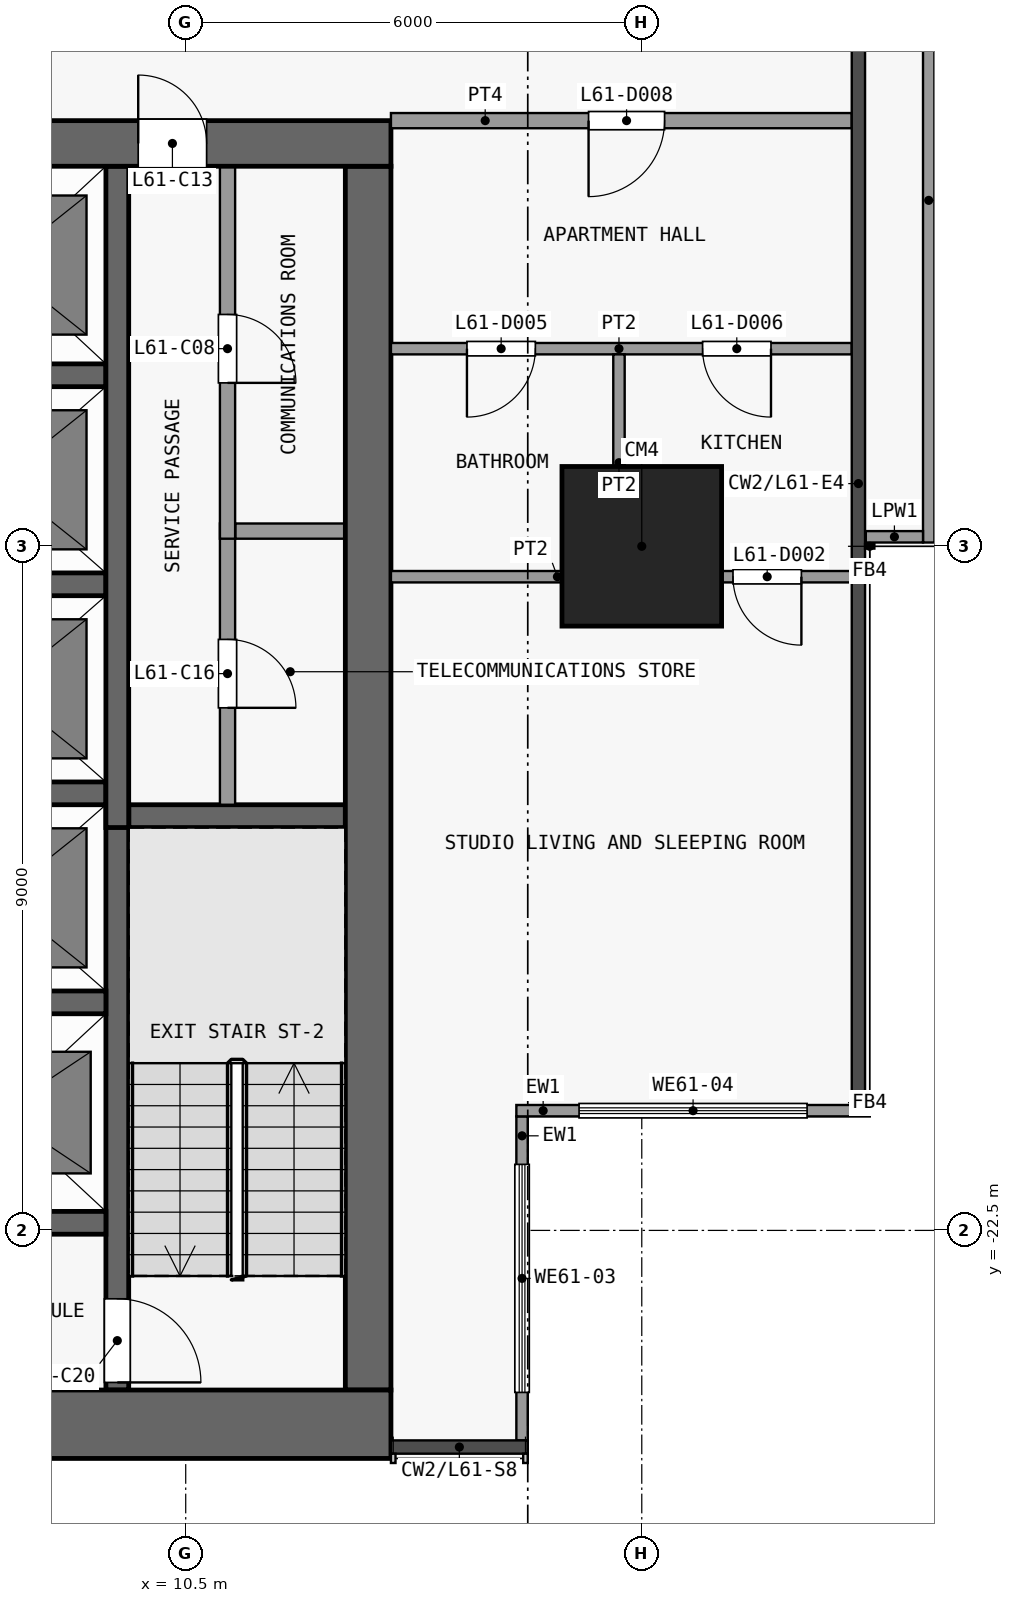
"""IFC4 building model, lengths in metres.
Left out: names, types, materials, properties, quantities, classifications, styles, units other than length and angle.
Written with IfcOpenShell. Run it as: python <this file> out.ifc"""

import sys

from ifc_helpers import new_model, si_unit, direction, frame, frame_2d, origin, origin_2d, place, context, subcontext, project, spatial, rectangle, extrude, element, fill, save


model = new_model("IFC4")
c1 = context("Model", 3, precision=1e-05, world=origin(), true_north=direction((0.0, 1.0)))
c2 = subcontext(c1, "Body", "Model", "MODEL_VIEW")
j1 = project(units=[si_unit("LENGTHUNIT", "METRE"), si_unit("PLANEANGLEUNIT", "RADIAN")], contexts=[c1])
p1 = place(None, origin())
s1 = spatial("IfcSite", under=j1, at=p1, CompositionType="ELEMENT")
p2 = place(p1, origin())
s2 = spatial("IfcBuilding", under=s1, at=p2, CompositionType="ELEMENT")
p3 = place(p2, frame((0.0, 0.0, 241.1)))
s3 = spatial("IfcBuildingStorey", under=s2, at=p3, CompositionType="ELEMENT", Elevation=241.1)
p4 = place(p3, frame((16.5, -13.5, 0.0), z_axis=(0.0, 0.0, 1.0), x_axis=(1.0, 0.0, 0.0)))
e1 = element("IfcColumn", 1, at=p4, inside=s3, PredefinedType="COLUMN", context=c2, shape_type="SweptSolid", body=[
    extrude(rectangle(XDim=2.1, YDim=2.1, at=origin_2d()), origin(), (0.0, 0.0, 1.0), 3.6),
])
p5 = place(p3, frame((-13.2, -25.05, 0.0), z_axis=(0.0, 0.0, 1.0), x_axis=(1.0, 0.0, 0.0)))
e2 = element("IfcWall", 2, at=p5, inside=s3, PredefinedType="SHEAR", context=c2, shape_type="SweptSolid", body=[
    extrude(rectangle(XDim=26.4, YDim=0.9, at=frame_2d((13.2, 0.0))), origin(), (0.0, 0.0, 1.0), 3.3),
])
p6 = place(p3, frame((-13.2, -8.2, 0.0), z_axis=(0.0, 0.0, 1.0), x_axis=(1.0, 0.0, 0.0)))
e3 = element("IfcWall", 3, at=p6, inside=s3, PredefinedType="SHEAR", context=c2, shape_type="SweptSolid", body=[
    extrude(rectangle(XDim=26.4, YDim=0.6, at=frame_2d((13.2, 0.0))), origin(), (0.0, 0.0, 1.0), 3.3),
])
p7 = place(p6, frame((7.5, 0.0, 0.0)))
e4 = element("IfcOpeningElement", 4, at=p7, cuts=e3, PredefinedType="OPENING", context=c2, shape_type="SweptSolid", body=[
    extrude(rectangle(XDim=1.8, YDim=2.1, at=frame_2d((0.9, 1.05))), frame((0.0, 0.31, 0.0), z_axis=(0.0, -1.0, 0.0), x_axis=(1.0, 0.0, 0.0)), (0.0, 0.0, 1.0), 0.62),
])
p8 = place(p6, frame((17.1, 0.0, 0.0)))
e5 = element("IfcOpeningElement", 5, at=p8, cuts=e3, PredefinedType="OPENING", context=c2, shape_type="SweptSolid", body=[
    extrude(rectangle(XDim=1.8, YDim=2.1, at=frame_2d((0.9, 1.05))), frame((0.0, 0.31, 0.0), z_axis=(0.0, -1.0, 0.0), x_axis=(1.0, 0.0, 0.0)), (0.0, 0.0, 1.0), 0.62),
])
p9 = place(p6, frame((2.425, 0.0, 0.0)))
e6 = element("IfcOpeningElement", 6, at=p9, cuts=e3, PredefinedType="OPENING", context=c2, shape_type="SweptSolid", body=[
    extrude(rectangle(XDim=0.9, YDim=2.1, at=frame_2d((0.45, 1.05))), frame((0.0, 0.31, 0.0), z_axis=(0.0, -1.0, 0.0), x_axis=(1.0, 0.0, 0.0)), (0.0, 0.0, 1.0), 0.62),
])
p10 = place(p6, frame((23.075, 0.0, 0.0)))
e7 = element("IfcOpeningElement", 7, at=p10, cuts=e3, PredefinedType="OPENING", context=c2, shape_type="SweptSolid", body=[
    extrude(rectangle(XDim=0.9, YDim=2.1, at=frame_2d((0.45, 1.05))), frame((0.0, 0.31, 0.0), z_axis=(0.0, -1.0, 0.0), x_axis=(1.0, 0.0, 0.0)), (0.0, 0.0, 1.0), 0.62),
])
p11 = place(p3, frame((12.9, -24.6, 0.0), z_axis=(0.0, 0.0, 1.0), x_axis=(0.0, 1.0, 0.0)))
e8 = element("IfcWall", 8, at=p11, inside=s3, PredefinedType="SHEAR", context=c2, shape_type="SweptSolid", body=[
    extrude(rectangle(XDim=16.1, YDim=0.6, at=frame_2d((8.05, 0.0))), origin(), (0.0, 0.0, 1.0), 3.3),
])
for number, where, z_axis, x_axis in (
    (9, (6.65, -22.4, 0.0), (0.0, 0.0, 1.0), (1.0, 0.0, 0.0)),
    (10, (6.65, -19.5, 0.0), (0.0, 0.0, 1.0), (1.0, 0.0, 0.0)),
):
    element("IfcWall", number, at=place(p3, frame(where, z_axis=z_axis, x_axis=x_axis)), inside=s3, PredefinedType="SHEAR", context=c2, shape_type="SweptSolid", body=[
        extrude(rectangle(XDim=2.8, YDim=0.3, at=frame_2d((1.4, 0.0))), origin(), (0.0, 0.0, 1.0), 3.3),
    ])
p12 = place(p3, frame((9.75, -17.05, 0.0), z_axis=(0.0, 0.0, 1.0), x_axis=(1.0, 0.0, 0.0)))
e11 = element("IfcWall", 11, at=p12, inside=s3, PredefinedType="SHEAR", context=c2, shape_type="SweptSolid", body=[
    extrude(rectangle(XDim=2.85, YDim=0.3, at=frame_2d((1.425, 0.0))), origin(), (0.0, 0.0, 1.0), 3.3),
])
for number, where, z_axis, x_axis in (
    (12, (6.65, -16.75, 0.0), (0.0, 0.0, 1.0), (1.0, 0.0, 0.0)),
    (13, (6.65, -14.0, 0.0), (0.0, 0.0, 1.0), (1.0, 0.0, 0.0)),
):
    element("IfcWall", number, at=place(p3, frame(where, z_axis=z_axis, x_axis=x_axis)), inside=s3, PredefinedType="SHEAR", context=c2, shape_type="SweptSolid", body=[
        extrude(rectangle(XDim=2.8, YDim=0.3, at=frame_2d((1.4, 0.0))), origin(), (0.0, 0.0, 1.0), 3.3),
    ])
p13 = place(p3, frame((11.15, -13.3, 0.0), z_axis=(0.0, 0.0, 1.0), x_axis=(1.0, 0.0, 0.0)))
e14 = element("IfcWall", 14, at=p13, inside=s3, PredefinedType="PARTITIONING", context=c2, shape_type="SweptSolid", body=[
    extrude(rectangle(XDim=1.45, YDim=0.2, at=frame_2d((0.725, 0.0))), origin(), (0.0, 0.0, 1.0), 3.3),
])
p14 = place(p3, frame((6.65, -11.25, 0.0), z_axis=(0.0, 0.0, 1.0), x_axis=(1.0, 0.0, 0.0)))
e15 = element("IfcWall", 15, at=p14, inside=s3, PredefinedType="SHEAR", context=c2, shape_type="SweptSolid", body=[
    extrude(rectangle(XDim=2.8, YDim=0.3, at=frame_2d((1.4, 0.0))), origin(), (0.0, 0.0, 1.0), 3.3),
])
p15 = place(p3, frame((9.6, -16.9, 0.0), z_axis=(0.0, 0.0, 1.0), x_axis=(0.0, -1.0, 0.0)))
e16 = element("IfcWall", 16, at=p15, inside=s3, PredefinedType="SHEAR", context=c2, shape_type="SweptSolid", body=[
    extrude(rectangle(XDim=7.7, YDim=0.3, at=frame_2d((3.85, 0.0))), origin(), (0.0, 0.0, 1.0), 3.3),
])
p16 = place(p15, frame((6.5, 0.0, 0.0)))
e17 = element("IfcOpeningElement", 17, at=p16, cuts=e16, PredefinedType="OPENING", context=c2, shape_type="SweptSolid", body=[
    extrude(rectangle(XDim=1.1, YDim=2.1, at=frame_2d((0.55, 1.05))), frame((0.0, 0.16, 0.0), z_axis=(0.0, -1.0, 0.0), x_axis=(1.0, 0.0, 0.0)), (0.0, 0.0, 1.0), 0.32),
])
p17 = place(p3, frame((9.6, -17.2, 0.0), z_axis=(0.0, 0.0, 1.0), x_axis=(0.0, 1.0, 0.0)))
e18 = element("IfcWall", 18, at=p17, inside=s3, PredefinedType="SHEAR", context=c2, shape_type="SweptSolid", body=[
    extrude(rectangle(XDim=8.7, YDim=0.3, at=frame_2d((4.35, 0.0))), origin(), (0.0, 0.0, 1.0), 3.3),
])
p18 = place(p3, frame((11.05, -13.2, 0.0), z_axis=(0.0, 0.0, 1.0), x_axis=(0.0, -1.0, 0.0)))
e19 = element("IfcWall", 19, at=p18, inside=s3, PredefinedType="PARTITIONING", context=c2, shape_type="SweptSolid", body=[
    extrude(rectangle(XDim=3.7, YDim=0.2, at=frame_2d((1.85, 0.0))), origin(), (0.0, 0.0, 1.0), 3.3),
])
p19 = place(p18, frame((1.525, 0.0, 0.0)))
e20 = element("IfcOpeningElement", 20, at=p19, cuts=e19, PredefinedType="OPENING", context=c2, shape_type="SweptSolid", body=[
    extrude(rectangle(XDim=0.9, YDim=2.1, at=frame_2d((0.45, 1.05))), frame((0.0, 0.11, 0.0), z_axis=(0.0, -1.0, 0.0), x_axis=(1.0, 0.0, 0.0)), (0.0, 0.0, 1.0), 0.22),
])
p20 = place(p3, frame((11.05, -8.5, 0.0), z_axis=(0.0, 0.0, 1.0), x_axis=(0.0, -1.0, 0.0)))
e21 = element("IfcWall", 21, at=p20, inside=s3, PredefinedType="PARTITIONING", context=c2, shape_type="SweptSolid", body=[
    extrude(rectangle(XDim=4.9, YDim=0.2, at=frame_2d((2.45, 0.0))), origin(), (0.0, 0.0, 1.0), 3.3),
])
p21 = place(p20, frame((1.95, 0.0, 0.0)))
e22 = element("IfcOpeningElement", 22, at=p21, cuts=e21, PredefinedType="OPENING", context=c2, shape_type="SweptSolid", body=[
    extrude(rectangle(XDim=0.9, YDim=2.1, at=frame_2d((0.45, 1.05))), frame((0.0, 0.11, 0.0), z_axis=(0.0, -1.0, 0.0), x_axis=(1.0, 0.0, 0.0)), (0.0, 0.0, 1.0), 0.22),
])
p22 = place(p3, frame((14.925, -21.0, 0.0), z_axis=(0.0, 0.0, 1.0), x_axis=(0.0, -1.0, 0.0)))
e23 = element("IfcWall", 23, at=p22, inside=s3, PredefinedType="SOLIDWALL", context=c2, shape_type="SweptSolid", body=[
    extrude(rectangle(XDim=4.262, YDim=0.15, at=frame_2d((2.131, 0.0))), origin(), (0.0, 0.0, 1.0), 3.3),
])
p23 = place(p22, frame((0.631, 0.0, 0.9)))
e24 = element("IfcOpeningElement", 24, at=p23, cuts=e23, PredefinedType="OPENING", context=c2, shape_type="SweptSolid", body=[
    extrude(rectangle(XDim=3.0, YDim=2.4, at=frame_2d((1.5, 1.2))), frame((0.0, 0.085, 0.0), z_axis=(0.0, -1.0, 0.0), x_axis=(1.0, 0.0, 0.0)), (0.0, 0.0, 1.0), 0.17),
])
p24 = place(p3, frame((19.5, -20.925, 0.0), z_axis=(0.0, 0.0, 1.0), x_axis=(-1.0, 0.0, 0.0)))
e25 = element("IfcWall", 25, at=p24, inside=s3, PredefinedType="SOLIDWALL", context=c2, shape_type="SweptSolid", body=[
    extrude(rectangle(XDim=4.65, YDim=0.15, at=frame_2d((2.325, 0.0))), origin(), (0.0, 0.0, 1.0), 3.3),
])
p25 = place(p24, frame((0.825, 0.0, 0.9)))
e26 = element("IfcOpeningElement", 26, at=p25, cuts=e25, PredefinedType="OPENING", context=c2, shape_type="SweptSolid", body=[
    extrude(rectangle(XDim=3.0, YDim=2.4, at=frame_2d((1.5, 1.2))), frame((0.0, 0.085, 0.0), z_axis=(0.0, -1.0, 0.0), x_axis=(1.0, 0.0, 0.0)), (0.0, 0.0, 1.0), 0.17),
])
p26 = place(p3, frame((20.275, -4.448, 0.0), z_axis=(0.0, 0.0, 1.0), x_axis=(0.0, -1.0, 0.0)))
e27 = element("IfcWall", 27, at=p26, inside=s3, PredefinedType="PARAPET", context=c2, shape_type="SweptSolid", body=[
    extrude(rectangle(XDim=9.002, YDim=0.15, at=frame_2d((4.501, 0.0))), origin(), (0.0, 0.0, 1.0), 1.15),
])
p27 = place(p3, frame((20.2, -13.375, 0.0), z_axis=(0.0, 0.0, 1.0), x_axis=(-1.0, 0.0, 0.0)))
e28 = element("IfcWall", 28, at=p27, inside=s3, PredefinedType="PARAPET", context=c2, shape_type="SweptSolid", body=[
    extrude(rectangle(XDim=0.752, YDim=0.15, at=frame_2d((0.376, 0.0))), origin(), (0.0, 0.0, 1.0), 1.15),
])
p28 = place(p3, frame((13.2, -13.9, 0.0), z_axis=(0.0, 0.0, 1.0), x_axis=(1.0, 0.0, 0.0)))
e29 = element("IfcWall", 29, at=p28, inside=s3, PredefinedType="PARTITIONING", context=c2, shape_type="SweptSolid", body=[
    extrude(rectangle(XDim=6.062, YDim=0.15, at=frame_2d((3.031, 0.0))), origin(), (0.0, 0.0, 1.0), 3.3),
])
p29 = place(p28, frame((4.5, 0.0, 0.0)))
e30 = element("IfcOpeningElement", 30, at=p29, cuts=e29, PredefinedType="OPENING", context=c2, shape_type="SweptSolid", body=[
    extrude(rectangle(XDim=0.9, YDim=2.1, at=frame_2d((0.45, 1.05))), frame((0.0, 0.085, 0.0), z_axis=(0.0, -1.0, 0.0), x_axis=(1.0, 0.0, 0.0)), (0.0, 0.0, 1.0), 0.17),
])
p30 = place(p3, frame((13.2, -10.9, 0.0), z_axis=(0.0, 0.0, 1.0), x_axis=(1.0, 0.0, 0.0)))
e31 = element("IfcWall", 31, at=p30, inside=s3, PredefinedType="PARTITIONING", context=c2, shape_type="SweptSolid", body=[
    extrude(rectangle(XDim=6.062, YDim=0.15, at=frame_2d((3.031, 0.0))), origin(), (0.0, 0.0, 1.0), 3.3),
])
p31 = place(p30, frame((1.0, 0.0, 0.0)))
e32 = element("IfcOpeningElement", 32, at=p31, cuts=e31, PredefinedType="OPENING", context=c2, shape_type="SweptSolid", body=[
    extrude(rectangle(XDim=0.9, YDim=2.1, at=frame_2d((0.45, 1.05))), frame((0.0, 0.085, 0.0), z_axis=(0.0, -1.0, 0.0), x_axis=(1.0, 0.0, 0.0)), (0.0, 0.0, 1.0), 0.17),
])
p32 = place(p30, frame((4.1, 0.0, 0.0)))
e33 = element("IfcOpeningElement", 33, at=p32, cuts=e31, PredefinedType="OPENING", context=c2, shape_type="SweptSolid", body=[
    extrude(rectangle(XDim=0.9, YDim=2.1, at=frame_2d((0.45, 1.05))), frame((0.0, 0.085, 0.0), z_axis=(0.0, -1.0, 0.0), x_axis=(1.0, 0.0, 0.0)), (0.0, 0.0, 1.0), 0.17),
])
p33 = place(p3, frame((13.2, -7.9, 0.0), z_axis=(0.0, 0.0, 1.0), x_axis=(1.0, 0.0, 0.0)))
e34 = element("IfcWall", 34, at=p33, inside=s3, PredefinedType="PARTITIONING", context=c2, shape_type="SweptSolid", body=[
    extrude(rectangle(XDim=6.062, YDim=0.2, at=frame_2d((3.031, 0.0))), origin(), (0.0, 0.0, 1.0), 3.3),
])
p34 = place(p33, frame((2.6, 0.0, 0.0)))
e35 = element("IfcOpeningElement", 35, at=p34, cuts=e34, PredefinedType="OPENING", context=c2, shape_type="SweptSolid", body=[
    extrude(rectangle(XDim=1.0, YDim=2.1, at=frame_2d((0.5, 1.05))), frame((0.0, 0.11, 0.0), z_axis=(0.0, -1.0, 0.0), x_axis=(1.0, 0.0, 0.0)), (0.0, 0.0, 1.0), 0.22),
])
p35 = place(p3, frame((16.2, -13.825, 0.0), z_axis=(0.0, 0.0, 1.0), x_axis=(0.0, 1.0, 0.0)))
e36 = element("IfcWall", 36, at=p35, inside=s3, PredefinedType="PARTITIONING", context=c2, shape_type="SweptSolid", body=[
    extrude(rectangle(XDim=2.85, YDim=0.15, at=frame_2d((1.425, 0.0))), origin(), (0.0, 0.0, 1.0), 3.3),
])
p36 = place(p21, origin())
e37 = element("IfcDoor", 37, at=p36, inside=s3, OperationType="SINGLE_SWING_RIGHT", PredefinedType="DOOR", context=c2, shape_type="SweptSolid", body=[
    extrude(rectangle(XDim=0.9, YDim=2.1, at=frame_2d((0.45, 1.05))), frame((0.0, 0.025, 0.0), z_axis=(0.0, -1.0, 0.0), x_axis=(1.0, 0.0, 0.0)), (0.0, 0.0, 1.0), 0.05),
])
fill(e22, e37)
p37 = place(p10, origin())
e38 = element("IfcDoor", 38, at=p37, inside=s3, OperationType="SINGLE_SWING_LEFT", PredefinedType="DOOR", context=c2, shape_type="SweptSolid", body=[
    extrude(rectangle(XDim=0.9, YDim=2.1, at=frame_2d((0.45, 1.05))), frame((0.0, 0.025, 0.0), z_axis=(0.0, -1.0, 0.0), x_axis=(1.0, 0.0, 0.0)), (0.0, 0.0, 1.0), 0.05),
])
fill(e7, e38)
p38 = place(p19, origin())
e39 = element("IfcDoor", 39, at=p38, inside=s3, OperationType="SINGLE_SWING_RIGHT", PredefinedType="DOOR", context=c2, shape_type="SweptSolid", body=[
    extrude(rectangle(XDim=0.9, YDim=2.1, at=frame_2d((0.45, 1.05))), frame((0.0, 0.025, 0.0), z_axis=(0.0, -1.0, 0.0), x_axis=(1.0, 0.0, 0.0)), (0.0, 0.0, 1.0), 0.05),
])
fill(e20, e39)
p39 = place(p16, origin())
e40 = element("IfcDoor", 40, at=p39, inside=s3, OperationType="SINGLE_SWING_RIGHT", PredefinedType="DOOR", context=c2, shape_type="SweptSolid", body=[
    extrude(rectangle(XDim=1.1, YDim=2.1, at=frame_2d((0.55, 1.05))), frame((0.0, 0.025, 0.0), z_axis=(0.0, -1.0, 0.0), x_axis=(1.0, 0.0, 0.0)), (0.0, 0.0, 1.0), 0.05),
])
fill(e17, e40)
p40 = place(p23, origin())
e41 = element("IfcWindow", 41, at=p40, inside=s3, PartitioningType="SINGLE_PANEL", PredefinedType="WINDOW", context=c2, shape_type="SweptSolid", body=[
    extrude(rectangle(XDim=3.0, YDim=2.4, at=frame_2d((1.5, 1.2))), frame((0.0, 0.03, 0.0), z_axis=(0.0, -1.0, 0.0), x_axis=(1.0, 0.0, 0.0)), (0.0, 0.0, 1.0), 0.06),
])
fill(e24, e41)
p41 = place(p25, origin())
e42 = element("IfcWindow", 42, at=p41, inside=s3, PartitioningType="SINGLE_PANEL", PredefinedType="WINDOW", context=c2, shape_type="SweptSolid", body=[
    extrude(rectangle(XDim=3.0, YDim=2.4, at=frame_2d((1.5, 1.2))), frame((0.0, 0.03, 0.0), z_axis=(0.0, -1.0, 0.0), x_axis=(1.0, 0.0, 0.0)), (0.0, 0.0, 1.0), 0.06),
])
fill(e26, e42)
p42 = place(p29, origin())
e43 = element("IfcDoor", 43, at=p42, inside=s3, OperationType="SINGLE_SWING_RIGHT", PredefinedType="DOOR", context=c2, shape_type="SweptSolid", body=[
    extrude(rectangle(XDim=0.9, YDim=2.1, at=frame_2d((0.45, 1.05))), frame((0.0, 0.025, 0.0), z_axis=(0.0, -1.0, 0.0), x_axis=(1.0, 0.0, 0.0)), (0.0, 0.0, 1.0), 0.05),
])
fill(e30, e43)
p43 = place(p31, origin())
e44 = element("IfcDoor", 44, at=p43, inside=s3, OperationType="SINGLE_SWING_LEFT", PredefinedType="DOOR", context=c2, shape_type="SweptSolid", body=[
    extrude(rectangle(XDim=0.9, YDim=2.1, at=frame_2d((0.45, 1.05))), frame((0.0, 0.025, 0.0), z_axis=(0.0, -1.0, 0.0), x_axis=(1.0, 0.0, 0.0)), (0.0, 0.0, 1.0), 0.05),
])
fill(e32, e44)
p44 = place(p32, origin())
e45 = element("IfcDoor", 45, at=p44, inside=s3, OperationType="SINGLE_SWING_RIGHT", PredefinedType="DOOR", context=c2, shape_type="SweptSolid", body=[
    extrude(rectangle(XDim=0.9, YDim=2.1, at=frame_2d((0.45, 1.05))), frame((0.0, 0.025, 0.0), z_axis=(0.0, -1.0, 0.0), x_axis=(1.0, 0.0, 0.0)), (0.0, 0.0, 1.0), 0.05),
])
fill(e33, e45)
p45 = place(p34, origin())
e46 = element("IfcDoor", 46, at=p45, inside=s3, OperationType="SINGLE_SWING_LEFT", PredefinedType="DOOR", context=c2, shape_type="SweptSolid", body=[
    extrude(rectangle(XDim=1.0, YDim=2.1, at=frame_2d((0.5, 1.05))), frame((0.0, 0.025, 0.0), z_axis=(0.0, -1.0, 0.0), x_axis=(1.0, 0.0, 0.0)), (0.0, 0.0, 1.0), 0.05),
])
fill(e35, e46)
save(model, sys.argv[1])
